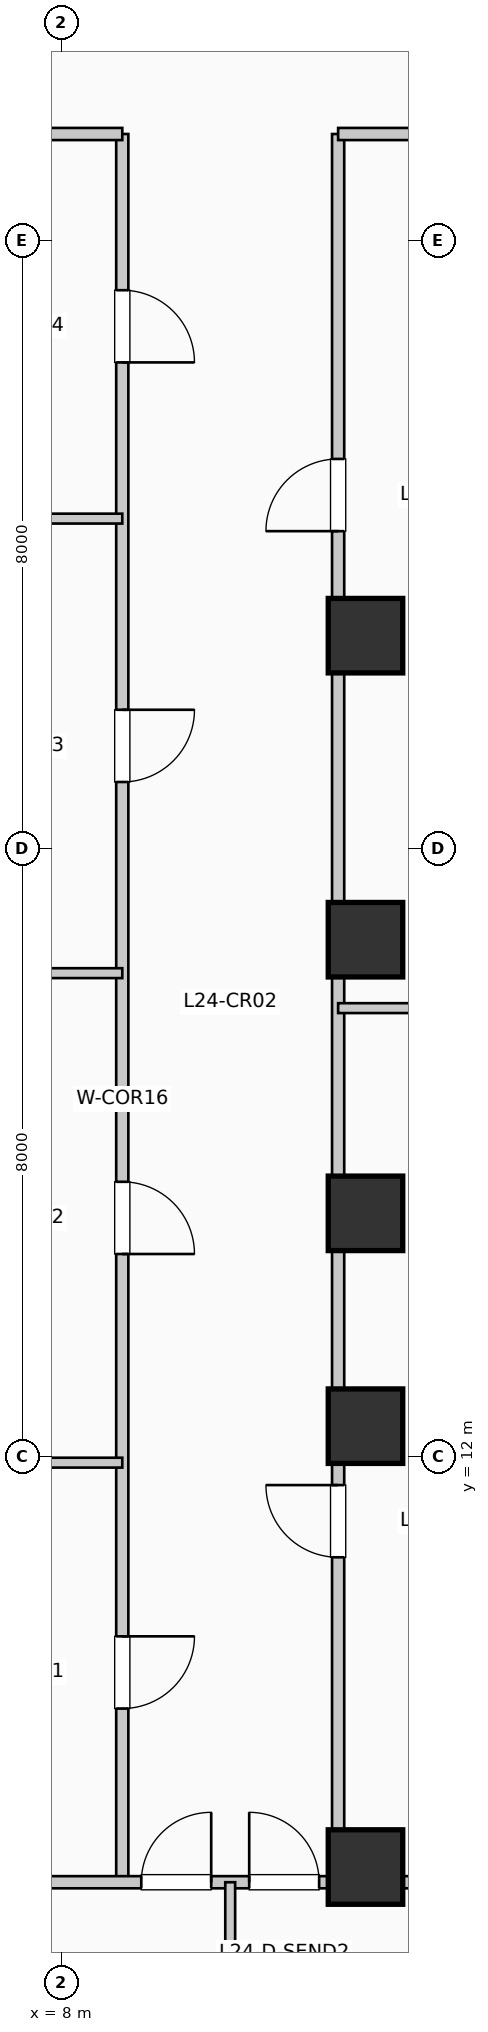
"""IFC4 building model, lengths in metres.
Left out: names, types, materials, properties, quantities, classifications, styles, units other than length and angle.
Written with IfcOpenShell. Run it as: python <this file> out.ifc"""

import sys

from ifc_helpers import new_model, si_unit, direction, frame, frame_2d, origin, origin_2d, place, context, subcontext, project, spatial, rectangle, extrude, element, fill, save


model = new_model("IFC4")
c1 = context("Model", 3, precision=1e-05, world=origin(), true_north=direction((0.0, 1.0)))
c2 = subcontext(c1, "Body", "Model", "MODEL_VIEW")
j1 = project(units=[si_unit("LENGTHUNIT", "METRE"), si_unit("PLANEANGLEUNIT", "RADIAN")], contexts=[c1])
p1 = place(None, origin())
s1 = spatial("IfcSite", under=j1, at=p1, CompositionType="ELEMENT")
p2 = place(p1, origin())
s2 = spatial("IfcBuilding", under=s1, at=p2, CompositionType="ELEMENT")
p3 = place(p2, frame((0.0, 0.0, 102.63)))
s3 = spatial("IfcBuildingStorey", under=s2, at=p3, CompositionType="ELEMENT", Elevation=102.63)
for number, where, z_axis, x_axis in (
    (1, (12.0, 6.6, 0.0), (0.0, 0.0, 1.0), (1.0, 0.0, 0.0)),
    (2, (12.0, 12.4, 0.0), (0.0, 0.0, 1.0), (1.0, 0.0, 0.0)),
    (3, (12.0, 15.2, 0.0), (0.0, 0.0, 1.0), (1.0, 0.0, 0.0)),
    (4, (12.0, 18.8, 0.0), (0.0, 0.0, 1.0), (1.0, 0.0, 0.0)),
    (5, (12.0, 22.8, 0.0), (0.0, 0.0, 1.0), (1.0, 0.0, 0.0)),
):
    element("IfcColumn", number, at=place(p3, frame(where, z_axis=z_axis, x_axis=x_axis)), inside=s3, PredefinedType="COLUMN", context=c2, shape_type="SweptSolid", body=[
        extrude(rectangle(XDim=0.98, YDim=0.98, at=origin_2d()), origin(), (0.0, 0.0, 1.0), 3.96),
    ])
p4 = place(p3, frame((8.8, 6.4, 0.0), z_axis=(0.0, 0.0, 1.0), x_axis=(0.0, 1.0, 0.0)))
e6 = element("IfcWall", 6, at=p4, inside=s3, PredefinedType="PARTITIONING", context=c2, shape_type="SweptSolid", body=[
    extrude(rectangle(XDim=23.0, YDim=0.16, at=frame_2d((11.5, 0.0))), origin(), (0.0, 0.0, 1.0), 3.71),
])
p5 = place(p4, frame((3.235, 0.0, 0.0), z_axis=(0.0, 0.0, 1.0), x_axis=(-1.0, 0.0, 0.0)))
e7 = element("IfcOpeningElement", 7, at=p5, cuts=e6, PredefinedType="OPENING", context=c2, shape_type="SweptSolid", body=[
    extrude(rectangle(XDim=0.95, YDim=2.15, at=frame_2d((0.475, 1.075))), frame((0.0, 0.09, 0.0), z_axis=(0.0, -1.0, 0.0), x_axis=(1.0, 0.0, 0.0)), (0.0, 0.0, 1.0), 0.18),
])
p6 = place(p4, frame((9.215, 0.0, 0.0), z_axis=(0.0, 0.0, 1.0), x_axis=(-1.0, 0.0, 0.0)))
e8 = element("IfcOpeningElement", 8, at=p6, cuts=e6, PredefinedType="OPENING", context=c2, shape_type="SweptSolid", body=[
    extrude(rectangle(XDim=0.95, YDim=2.15, at=frame_2d((0.475, 1.075))), frame((0.0, 0.09, 0.0), z_axis=(0.0, -1.0, 0.0), x_axis=(1.0, 0.0, 0.0)), (0.0, 0.0, 1.0), 0.18),
])
p7 = place(p4, frame((15.425, 0.0, 0.0), z_axis=(0.0, 0.0, 1.0), x_axis=(-1.0, 0.0, 0.0)))
e9 = element("IfcOpeningElement", 9, at=p7, cuts=e6, PredefinedType="OPENING", context=c2, shape_type="SweptSolid", body=[
    extrude(rectangle(XDim=0.95, YDim=2.15, at=frame_2d((0.475, 1.075))), frame((0.0, 0.09, 0.0), z_axis=(0.0, -1.0, 0.0), x_axis=(1.0, 0.0, 0.0)), (0.0, 0.0, 1.0), 0.18),
])
p8 = place(p4, frame((20.945, 0.0, 0.0), z_axis=(0.0, 0.0, 1.0), x_axis=(-1.0, 0.0, 0.0)))
e10 = element("IfcOpeningElement", 10, at=p8, cuts=e6, PredefinedType="OPENING", context=c2, shape_type="SweptSolid", body=[
    extrude(rectangle(XDim=0.95, YDim=2.15, at=frame_2d((0.475, 1.075))), frame((0.0, 0.09, 0.0), z_axis=(0.0, -1.0, 0.0), x_axis=(1.0, 0.0, 0.0)), (0.0, 0.0, 1.0), 0.18),
])
p9 = place(p3, frame((11.64, 6.4, 0.0), z_axis=(0.0, 0.0, 1.0), x_axis=(0.0, 1.0, 0.0)))
e11 = element("IfcWall", 11, at=p9, inside=s3, PredefinedType="PARTITIONING", context=c2, shape_type="SweptSolid", body=[
    extrude(rectangle(XDim=23.0, YDim=0.16, at=frame_2d((11.5, 0.0))), origin(), (0.0, 0.0, 1.0), 2.995),
])
p10 = place(p9, frame((4.275, 0.0, 0.0)))
e12 = element("IfcOpeningElement", 12, at=p10, cuts=e11, PredefinedType="OPENING", context=c2, shape_type="SweptSolid", body=[
    extrude(rectangle(XDim=0.95, YDim=2.15, at=frame_2d((0.475, 1.075))), frame((0.0, 0.09, 0.0), z_axis=(0.0, -1.0, 0.0), x_axis=(1.0, 0.0, 0.0)), (0.0, 0.0, 1.0), 0.18),
])
p11 = place(p9, frame((17.775, 0.0, 0.0)))
e13 = element("IfcOpeningElement", 13, at=p11, cuts=e11, PredefinedType="OPENING", context=c2, shape_type="SweptSolid", body=[
    extrude(rectangle(XDim=0.95, YDim=2.15, at=frame_2d((0.475, 1.075))), frame((0.0, 0.09, 0.0), z_axis=(0.0, -1.0, 0.0), x_axis=(1.0, 0.0, 0.0)), (0.0, 0.0, 1.0), 0.18),
])
p12 = place(p3, frame((0.19, 6.4, 0.0), z_axis=(0.0, 0.0, 1.0), x_axis=(1.0, 0.0, 0.0)))
e14 = element("IfcWall", 14, at=p12, inside=s3, PredefinedType="PARTITIONING", context=c2, shape_type="SweptSolid", body=[
    extrude(rectangle(XDim=23.26, YDim=0.16, at=frame_2d((11.63, 0.0))), origin(), (0.0, 0.0, 1.0), 2.995),
])
p13 = place(p12, frame((8.86, 0.0, 0.0)))
e15 = element("IfcOpeningElement", 15, at=p13, cuts=e14, PredefinedType="OPENING", context=c2, shape_type="SweptSolid", body=[
    extrude(rectangle(XDim=0.92, YDim=2.1, at=frame_2d((0.46, 1.05))), frame((0.0, 0.09, 0.0), z_axis=(0.0, -1.0, 0.0), x_axis=(1.0, 0.0, 0.0)), (0.0, 0.0, 1.0), 0.18),
])
p14 = place(p12, frame((10.28, 0.0, 0.0)))
e16 = element("IfcOpeningElement", 16, at=p14, cuts=e14, PredefinedType="OPENING", context=c2, shape_type="SweptSolid", body=[
    extrude(rectangle(XDim=0.92, YDim=2.1, at=frame_2d((0.46, 1.05))), frame((0.0, 0.09, 0.0), z_axis=(0.0, -1.0, 0.0), x_axis=(1.0, 0.0, 0.0)), (0.0, 0.0, 1.0), 0.18),
])
p15 = place(p3, frame((0.19, 29.4, 0.0), z_axis=(0.0, 0.0, 1.0), x_axis=(1.0, 0.0, 0.0)))
e17 = element("IfcWall", 17, at=p15, inside=s3, PredefinedType="PARTITIONING", context=c2, shape_type="SweptSolid", body=[
    extrude(rectangle(XDim=8.61, YDim=0.16, at=frame_2d((4.305, 0.0))), origin(), (0.0, 0.0, 1.0), 3.365),
])
p16 = place(p3, frame((11.64, 29.4, 0.0), z_axis=(0.0, 0.0, 1.0), x_axis=(1.0, 0.0, 0.0)))
e18 = element("IfcWall", 18, at=p16, inside=s3, PredefinedType="PARTITIONING", context=c2, shape_type="SweptSolid", body=[
    extrude(rectangle(XDim=11.81, YDim=0.16, at=frame_2d((5.905, 0.0))), origin(), (0.0, 0.0, 1.0), 3.71),
])
p17 = place(p3, frame((10.22, 1.04, 0.0), z_axis=(0.0, 0.0, 1.0), x_axis=(0.0, 1.0, 0.0)))
e19 = element("IfcWall", 19, at=p17, inside=s3, PredefinedType="PARTITIONING", context=c2, shape_type="SweptSolid", body=[
    extrude(rectangle(XDim=5.36, YDim=0.13, at=frame_2d((2.68, 0.0))), origin(), (0.0, 0.0, 1.0), 3.71),
])
p18 = place(p3, frame((0.19, 11.92, 0.0), z_axis=(0.0, 0.0, 1.0), x_axis=(1.0, 0.0, 0.0)))
e20 = element("IfcWall", 20, at=p18, inside=s3, PredefinedType="PARTITIONING", context=c2, shape_type="SweptSolid", body=[
    extrude(rectangle(XDim=8.61, YDim=0.13, at=frame_2d((4.305, 0.0))), origin(), (0.0, 0.0, 1.0), 3.71),
])
p19 = place(p3, frame((0.19, 18.36, 0.0), z_axis=(0.0, 0.0, 1.0), x_axis=(1.0, 0.0, 0.0)))
e21 = element("IfcWall", 21, at=p19, inside=s3, PredefinedType="PARTITIONING", context=c2, shape_type="SweptSolid", body=[
    extrude(rectangle(XDim=8.61, YDim=0.13, at=frame_2d((4.305, 0.0))), origin(), (0.0, 0.0, 1.0), 2.995),
])
p20 = place(p3, frame((0.19, 24.34, 0.0), z_axis=(0.0, 0.0, 1.0), x_axis=(1.0, 0.0, 0.0)))
e22 = element("IfcWall", 22, at=p20, inside=s3, PredefinedType="PARTITIONING", context=c2, shape_type="SweptSolid", body=[
    extrude(rectangle(XDim=8.61, YDim=0.13, at=frame_2d((4.305, 0.0))), origin(), (0.0, 0.0, 1.0), 3.71),
])
p21 = place(p3, frame((11.64, 17.9, 0.0), z_axis=(0.0, 0.0, 1.0), x_axis=(1.0, 0.0, 0.0)))
e23 = element("IfcWall", 23, at=p21, inside=s3, PredefinedType="PARTITIONING", context=c2, shape_type="SweptSolid", body=[
    extrude(rectangle(XDim=11.81, YDim=0.13, at=frame_2d((5.905, 0.0))), origin(), (0.0, 0.0, 1.0), 3.71),
])
p22 = place(p13, origin())
e24 = element("IfcDoor", 24, at=p22, inside=s3, OperationType="SINGLE_SWING_RIGHT", PredefinedType="DOOR", context=c2, shape_type="SweptSolid", body=[
    extrude(rectangle(XDim=0.92, YDim=2.1, at=frame_2d((0.46, 1.05))), frame((0.0, 0.025, 0.0), z_axis=(0.0, -1.0, 0.0), x_axis=(1.0, 0.0, 0.0)), (0.0, 0.0, 1.0), 0.05),
])
fill(e15, e24)
p23 = place(p14, origin())
e25 = element("IfcDoor", 25, at=p23, inside=s3, OperationType="SINGLE_SWING_LEFT", PredefinedType="DOOR", context=c2, shape_type="SweptSolid", body=[
    extrude(rectangle(XDim=0.92, YDim=2.1, at=frame_2d((0.46, 1.05))), frame((0.0, 0.025, 0.0), z_axis=(0.0, -1.0, 0.0), x_axis=(1.0, 0.0, 0.0)), (0.0, 0.0, 1.0), 0.05),
])
fill(e16, e25)
p24 = place(p5, origin())
e26 = element("IfcDoor", 26, at=p24, inside=s3, OperationType="SINGLE_SWING_RIGHT", PredefinedType="DOOR", context=c2, shape_type="SweptSolid", body=[
    extrude(rectangle(XDim=0.95, YDim=2.15, at=frame_2d((0.475, 1.075))), frame((0.0, 0.025, 0.0), z_axis=(0.0, -1.0, 0.0), x_axis=(1.0, 0.0, 0.0)), (0.0, 0.0, 1.0), 0.05),
])
fill(e7, e26)
p25 = place(p6, origin())
e27 = element("IfcDoor", 27, at=p25, inside=s3, OperationType="SINGLE_SWING_LEFT", PredefinedType="DOOR", context=c2, shape_type="SweptSolid", body=[
    extrude(rectangle(XDim=0.95, YDim=2.15, at=frame_2d((0.475, 1.075))), frame((0.0, 0.025, 0.0), z_axis=(0.0, -1.0, 0.0), x_axis=(1.0, 0.0, 0.0)), (0.0, 0.0, 1.0), 0.05),
])
fill(e8, e27)
p26 = place(p7, origin())
e28 = element("IfcDoor", 28, at=p26, inside=s3, OperationType="SINGLE_SWING_RIGHT", PredefinedType="DOOR", context=c2, shape_type="SweptSolid", body=[
    extrude(rectangle(XDim=0.95, YDim=2.15, at=frame_2d((0.475, 1.075))), frame((0.0, 0.025, 0.0), z_axis=(0.0, -1.0, 0.0), x_axis=(1.0, 0.0, 0.0)), (0.0, 0.0, 1.0), 0.05),
])
fill(e9, e28)
p27 = place(p8, origin())
e29 = element("IfcDoor", 29, at=p27, inside=s3, OperationType="SINGLE_SWING_LEFT", PredefinedType="DOOR", context=c2, shape_type="SweptSolid", body=[
    extrude(rectangle(XDim=0.95, YDim=2.15, at=frame_2d((0.475, 1.075))), frame((0.0, 0.025, 0.0), z_axis=(0.0, -1.0, 0.0), x_axis=(1.0, 0.0, 0.0)), (0.0, 0.0, 1.0), 0.05),
])
fill(e10, e29)
p28 = place(p10, origin())
e30 = element("IfcDoor", 30, at=p28, inside=s3, OperationType="SINGLE_SWING_RIGHT", PredefinedType="DOOR", context=c2, shape_type="SweptSolid", body=[
    extrude(rectangle(XDim=0.95, YDim=2.15, at=frame_2d((0.475, 1.075))), frame((0.0, 0.025, 0.0), z_axis=(0.0, -1.0, 0.0), x_axis=(1.0, 0.0, 0.0)), (0.0, 0.0, 1.0), 0.05),
])
fill(e12, e30)
p29 = place(p11, origin())
e31 = element("IfcDoor", 31, at=p29, inside=s3, OperationType="SINGLE_SWING_LEFT", PredefinedType="DOOR", context=c2, shape_type="SweptSolid", body=[
    extrude(rectangle(XDim=0.95, YDim=2.15, at=frame_2d((0.475, 1.075))), frame((0.0, 0.025, 0.0), z_axis=(0.0, -1.0, 0.0), x_axis=(1.0, 0.0, 0.0)), (0.0, 0.0, 1.0), 0.05),
])
fill(e13, e31)
save(model, sys.argv[1])
